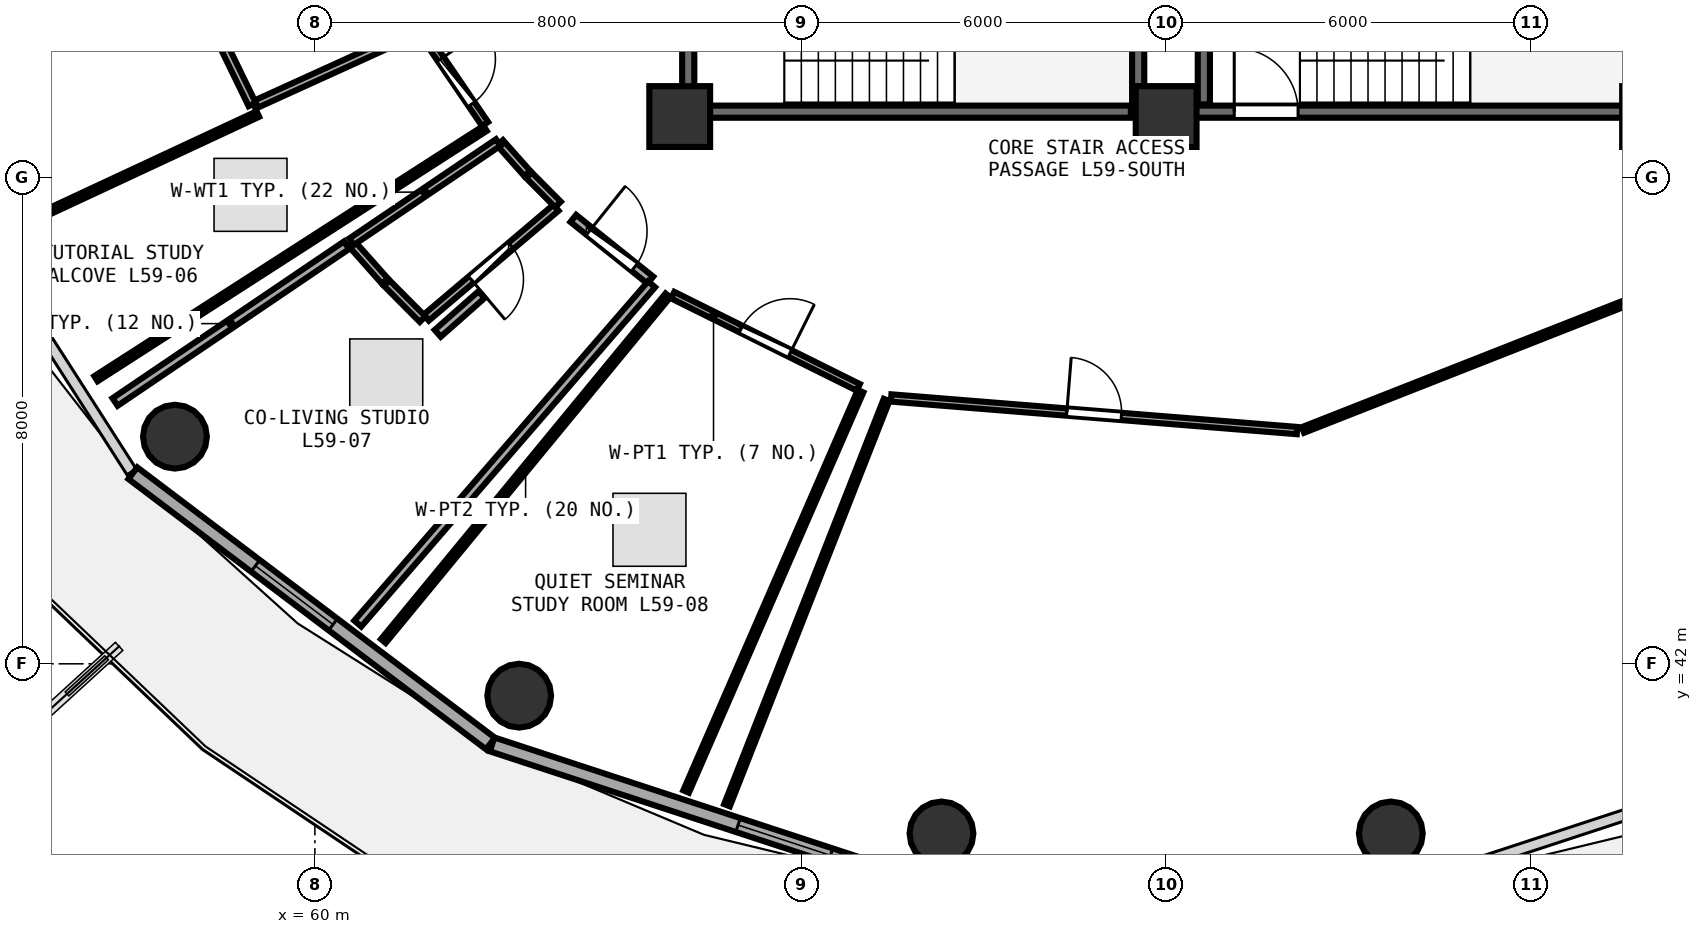
"""IFC4 building model, lengths in metres.
Left out: names, types, materials, properties, quantities, classifications, styles, units other than length and angle.
Written with IfcOpenShell. Run it as: python <this file> out.ifc"""

import sys

from ifc_helpers import new_model, si_unit, direction, frame, frame_2d, origin, origin_2d, place, context, subcontext, project, spatial, rectangle, circle, extrude, element, fill, save


model = new_model("IFC4")
c1 = context("Model", 3, precision=1e-05, world=origin(), true_north=direction((0.0, 1.0)))
c2 = subcontext(c1, "Body", "Model", "MODEL_VIEW")
j1 = project(units=[si_unit("LENGTHUNIT", "METRE"), si_unit("PLANEANGLEUNIT", "RADIAN")], contexts=[c1])
p1 = place(None, origin())
s1 = spatial("IfcSite", under=j1, at=p1, CompositionType="ELEMENT")
p2 = place(p1, origin())
s2 = spatial("IfcBuilding", under=s1, at=p2, CompositionType="ELEMENT")
p3 = place(p2, frame((0.0, 0.0, 230.7)))
s3 = spatial("IfcBuildingStorey", under=s2, at=p3, CompositionType="ELEMENT", Elevation=230.7)
for number, where, z_axis, x_axis in (
    (1, (66.0, 51.0, 0.0), (0.0, 0.0, 1.0), (1.0, 0.0, 0.0)),
    (2, (74.0, 51.0, 0.0), (0.0, 0.0, 1.0), (1.0, 0.0, 0.0)),
):
    element("IfcColumn", number, at=place(p3, frame(where, z_axis=z_axis, x_axis=x_axis)), inside=s3, PredefinedType="PILASTER", context=c2, shape_type="SweptSolid", body=[
        extrude(rectangle(XDim=1.0, YDim=1.0, at=origin_2d()), origin(), (0.0, 0.0, 1.0), 3.75),
    ])
for number, where, z_axis, x_axis in (
    (3, (57.698, 45.736, 0.0), (0.0, 0.0, 1.0), (1.0, 0.0, 0.0)),
    (4, (63.36, 41.476, 0.0), (0.0, 0.0, 1.0), (1.0, 0.0, 0.0)),
    (5, (70.305, 39.21, 0.0), (0.0, 0.0, 1.0), (1.0, 0.0, 0.0)),
    (6, (77.695, 39.21, 0.0), (0.0, 0.0, 1.0), (1.0, 0.0, 0.0)),
):
    element("IfcColumn", number, at=place(p3, frame(where, z_axis=z_axis, x_axis=x_axis)), inside=s3, PredefinedType="COLUMN", context=c2, shape_type="SweptSolid", body=[
        extrude(circle(Radius=0.525, at=origin_2d()), origin(), (0.0, 0.0, 1.0), 3.75),
    ])
p4 = place(p3, frame((57.006, 45.135, 0.0), z_axis=(0.0, 0.0, 1.0), x_axis=(0.797701674595, -0.603052268338, 0.0)))
e7 = element("IfcWall", 7, at=p4, inside=s3, PredefinedType="SOLIDWALL", context=c2, shape_type="SweptSolid", body=[
    extrude(rectangle(XDim=7.374, YDim=0.24, at=frame_2d((3.687, 0.0))), origin(), (0.0, 0.0, 1.0), 3.475),
])
p5 = place(p4, frame((2.527, 0.0, 0.85)))
e8 = element("IfcOpeningElement", 8, at=p5, cuts=e7, PredefinedType="OPENING", context=c2, shape_type="SweptSolid", body=[
    extrude(rectangle(XDim=1.6, YDim=1.45, at=frame_2d((0.8, 0.725))), frame((0.0, 0.13, 0.0), z_axis=(0.0, -1.0, 0.0), x_axis=(1.0, 0.0, 0.0)), (0.0, 0.0, 1.0), 0.26),
])
p6 = place(p3, frame((62.914, 40.675, 0.0), z_axis=(0.0, 0.0, 1.0), x_axis=(0.95022142767, -0.31157541366, 0.0)))
e9 = element("IfcWall", 9, at=p6, inside=s3, PredefinedType="SOLIDWALL", context=c2, shape_type="SweptSolid", body=[
    extrude(rectangle(XDim=7.594, YDim=0.24, at=frame_2d((3.797, 0.0))), origin(), (0.0, 0.0, 1.0), 3.475),
])
p7 = place(p6, frame((4.257, 0.0, 0.85)))
e10 = element("IfcOpeningElement", 10, at=p7, cuts=e9, PredefinedType="OPENING", context=c2, shape_type="SweptSolid", body=[
    extrude(rectangle(XDim=1.6, YDim=1.45, at=frame_2d((0.8, 0.725))), frame((0.0, 0.13, 0.0), z_axis=(0.0, -1.0, 0.0), x_axis=(1.0, 0.0, 0.0)), (0.0, 0.0, 1.0), 0.26),
])
p8 = place(p3, frame((74.0, 51.08, 0.0), z_axis=(0.0, 0.0, 1.0), x_axis=(1.0, 0.0, 0.0)))
e11 = element("IfcWall", 11, at=p8, inside=s3, PredefinedType="SHEAR", context=c2, shape_type="SweptSolid", body=[
    extrude(rectangle(XDim=7.9, YDim=0.2, at=frame_2d((3.95, 0.0))), origin(), (0.0, 0.0, 1.0), 3.49),
])
p9 = place(p8, frame((1.12, 0.0, 0.0)))
e12 = element("IfcOpeningElement", 12, at=p9, cuts=e11, PredefinedType="OPENING", context=c2, shape_type="SweptSolid", body=[
    extrude(rectangle(XDim=1.05, YDim=2.1, at=frame_2d((0.525, 1.05))), frame((0.0, 0.11, 0.0), z_axis=(0.0, -1.0, 0.0), x_axis=(1.0, 0.0, 0.0)), (0.0, 0.0, 1.0), 0.22),
])
p10 = place(p3, frame((74.62, 54.27, 0.0), z_axis=(0.0, 0.0, 1.0), x_axis=(0.0, -1.0, 0.0)))
e13 = element("IfcWall", 13, at=p10, inside=s3, PredefinedType="SHEAR", context=c2, shape_type="SweptSolid", body=[
    extrude(rectangle(XDim=3.07, YDim=0.2, at=frame_2d((1.535, 0.0))), origin(), (0.0, 0.0, 1.0), 3.49),
])
p11 = place(p3, frame((66.26, 51.08, 0.0), z_axis=(0.0, 0.0, 1.0), x_axis=(1.0, 0.0, 0.0)))
e14 = element("IfcWall", 14, at=p11, inside=s3, PredefinedType="SHEAR", context=c2, shape_type="SweptSolid", body=[
    extrude(rectangle(XDim=7.16, YDim=0.2, at=frame_2d((3.58, 0.0))), origin(), (0.0, 0.0, 1.0), 3.49),
])
p12 = place(p3, frame((73.54, 51.2, 0.0), z_axis=(0.0, 0.0, 1.0), x_axis=(0.0, 1.0, 0.0)))
e15 = element("IfcWall", 15, at=p12, inside=s3, PredefinedType="SHEAR", context=c2, shape_type="SweptSolid", body=[
    extrude(rectangle(XDim=3.07, YDim=0.2, at=frame_2d((1.535, 0.0))), origin(), (0.0, 0.0, 1.0), 3.49),
])
p13 = place(p3, frame((66.14, 54.27, 0.0), z_axis=(0.0, 0.0, 1.0), x_axis=(0.0, -1.0, 0.0)))
e16 = element("IfcWall", 16, at=p13, inside=s3, PredefinedType="SHEAR", context=c2, shape_type="SweptSolid", body=[
    extrude(rectangle(XDim=3.07, YDim=0.2, at=frame_2d((1.535, 0.0))), origin(), (0.0, 0.0, 1.0), 3.49),
])
p14 = place(p13, frame((1.01, 0.0, 0.0)))
e17 = element("IfcOpeningElement", 17, at=p14, cuts=e16, PredefinedType="OPENING", context=c2, shape_type="SweptSolid", body=[
    extrude(rectangle(XDim=1.05, YDim=2.1, at=frame_2d((0.525, 1.05))), frame((0.0, 0.11, 0.0), z_axis=(0.0, -1.0, 0.0), x_axis=(1.0, 0.0, 0.0)), (0.0, 0.0, 1.0), 0.22),
])
p15 = place(p3, frame((69.477, 46.372, 0.0), z_axis=(0.0, 0.0, 1.0), x_axis=(0.996785539967, -0.080116086476, 0.0)))
e18 = element("IfcWall", 18, at=p15, inside=s3, PredefinedType="PARTITIONING", context=c2, shape_type="SweptSolid", body=[
    extrude(rectangle(XDim=6.698, YDim=0.12, at=frame_2d((3.349, 0.0))), origin(), (0.0, 0.0, 1.0), 3.025),
])
p16 = place(p15, frame((2.899, 0.0, 0.0)))
e19 = element("IfcOpeningElement", 19, at=p16, cuts=e18, PredefinedType="OPENING", context=c2, shape_type="SweptSolid", body=[
    extrude(rectangle(XDim=0.9, YDim=2.08, at=frame_2d((0.45, 1.04))), frame((0.0, 0.07, 0.0), z_axis=(0.0, -1.0, 0.0), x_axis=(1.0, 0.0, 0.0)), (0.0, 0.0, 1.0), 0.14),
])
p17 = place(p3, frame((61.846, 52.273, 0.0), z_axis=(0.0, 0.0, 1.0), x_axis=(0.563860796601, -0.825869845712, 0.0)))
e20 = element("IfcWall", 20, at=p17, inside=s3, PredefinedType="PARTITIONING", context=c2, shape_type="SweptSolid", body=[
    extrude(rectangle(XDim=1.691, YDim=0.12, at=frame_2d((0.846, 0.0))), origin(), (0.0, 0.0, 1.0), 3.025),
])
p18 = place(p17, frame((0.396, 0.0, 0.0)))
e21 = element("IfcOpeningElement", 21, at=p18, cuts=e20, PredefinedType="OPENING", context=c2, shape_type="SweptSolid", body=[
    extrude(rectangle(XDim=0.9, YDim=2.08, at=frame_2d((0.45, 1.04))), frame((0.0, 0.07, 0.0), z_axis=(0.0, -1.0, 0.0), x_axis=(1.0, 0.0, 0.0)), (0.0, 0.0, 1.0), 0.14),
])
p19 = place(p3, frame((63.966, 49.501, 0.0), z_axis=(0.0, 0.0, 1.0), x_axis=(-0.763141339825, -0.646231611305, 0.0)))
e22 = element("IfcWall", 22, at=p19, inside=s3, PredefinedType="PLUMBINGWALL", context=c2, shape_type="SweptSolid", body=[
    extrude(rectangle(XDim=2.798, YDim=0.13, at=frame_2d((1.399, 0.0))), origin(), (0.0, 0.0, 1.0), 3.025),
])
p20 = place(p19, frame((0.969, 0.0, 0.0)))
e23 = element("IfcOpeningElement", 23, at=p20, cuts=e22, PredefinedType="OPENING", context=c2, shape_type="SweptSolid", body=[
    extrude(rectangle(XDim=0.86, YDim=2.05, at=frame_2d((0.43, 1.025))), frame((0.0, 0.075, 0.0), z_axis=(0.0, -1.0, 0.0), x_axis=(1.0, 0.0, 0.0)), (0.0, 0.0, 1.0), 0.15),
])
p21 = place(p3, frame((64.25, 49.324, 0.0), z_axis=(0.0, 0.0, 1.0), x_axis=(0.780560643324, -0.625080060547, 0.0)))
e24 = element("IfcWall", 24, at=p21, inside=s3, PredefinedType="PARTITIONING", context=c2, shape_type="SweptSolid", body=[
    extrude(rectangle(XDim=1.624, YDim=0.15, at=frame_2d((0.812, 0.0))), origin(), (0.0, 0.0, 1.0), 3.025),
])
p22 = place(p21, frame((0.337, 0.0, 0.0)))
e25 = element("IfcOpeningElement", 25, at=p22, cuts=e24, PredefinedType="OPENING", context=c2, shape_type="SweptSolid", body=[
    extrude(rectangle(XDim=0.95, YDim=2.08, at=frame_2d((0.475, 1.04))), frame((0.0, 0.085, 0.0), z_axis=(0.0, -1.0, 0.0), x_axis=(1.0, 0.0, 0.0)), (0.0, 0.0, 1.0), 0.17),
])
p23 = place(p3, frame((65.885, 48.063, 0.0), z_axis=(0.0, 0.0, 1.0), x_axis=(0.895499293581, -0.445062933973, 0.0)))
e26 = element("IfcWall", 26, at=p23, inside=s3, PredefinedType="PARTITIONING", context=c2, shape_type="SweptSolid", body=[
    extrude(rectangle(XDim=3.408, YDim=0.12, at=frame_2d((1.704, 0.0))), origin(), (0.0, 0.0, 1.0), 3.235),
])
p24 = place(p23, frame((1.254, 0.0, 0.0)))
e27 = element("IfcOpeningElement", 27, at=p24, cuts=e26, PredefinedType="OPENING", context=c2, shape_type="SweptSolid", body=[
    extrude(rectangle(XDim=0.9, YDim=2.08, at=frame_2d((0.45, 1.04))), frame((0.0, 0.07, 0.0), z_axis=(0.0, -1.0, 0.0), x_axis=(1.0, 0.0, 0.0)), (0.0, 0.0, 1.0), 0.14),
])
p25 = place(p3, frame((76.25, 45.846, 0.0), z_axis=(0.0, 0.0, 1.0), x_axis=(0.93054786628, 0.366170272635, 0.0)))
e28 = element("IfcWall", 28, at=p25, inside=s3, PredefinedType="PARTITIONING", context=c2, shape_type="SweptSolid", body=[
    extrude(rectangle(XDim=6.635, YDim=0.1, at=frame_2d((3.318, 0.0))), origin(), (0.0, 0.0, 1.0), 3.235),
])
p26 = place(p3, frame((66.778, 39.674, 0.0), z_axis=(0.0, 0.0, 1.0), x_axis=(0.366396673382, 0.930458745853, 0.0)))
e29 = element("IfcWall", 29, at=p26, inside=s3, PredefinedType="PARTITIONING", context=c2, shape_type="SweptSolid", body=[
    extrude(rectangle(XDim=7.164, YDim=0.1, at=frame_2d((3.582, 0.0))), origin(), (0.0, 0.0, 1.0), 3.075),
])
p27 = place(p3, frame((60.985, 53.961, 0.0), z_axis=(0.0, 0.0, 1.0), x_axis=(-0.954952218503, -0.29675960031, 0.0)))
e30 = element("IfcWall", 30, at=p27, inside=s3, PredefinedType="PARTITIONING", context=c2, shape_type="SweptSolid", body=[
    extrude(rectangle(XDim=6.946, YDim=0.1, at=frame_2d((3.473, 0.0))), origin(), (0.0, 0.0, 1.0), 3.175),
])
p28 = place(p3, frame((61.728, 52.43, 0.0), z_axis=(0.0, 0.0, 1.0), x_axis=(-0.910394340166, -0.413741640874, 0.0)))
e31 = element("IfcWall", 31, at=p28, inside=s3, PredefinedType="PLUMBINGWALL", context=c2, shape_type="SweptSolid", body=[
    extrude(rectangle(XDim=3.0, YDim=0.13, at=frame_2d((1.5, 0.0))), origin(), (0.0, 0.0, 1.0), 3.025),
])
p29 = place(p3, frame((58.969, 51.198, 0.0), z_axis=(0.0, 0.0, 1.0), x_axis=(-0.437811526414, 0.899066775795, 0.0)))
e32 = element("IfcWall", 32, at=p29, inside=s3, PredefinedType="PLUMBINGWALL", context=c2, shape_type="SweptSolid", body=[
    extrude(rectangle(XDim=1.666, YDim=0.13, at=frame_2d((0.833, 0.0))), origin(), (0.0, 0.0, 1.0), 3.025),
])
p30 = place(p3, frame((62.799, 50.805, 0.0), z_axis=(0.0, 0.0, 1.0), x_axis=(-0.841021030646, -0.541002426992, 0.0)))
e33 = element("IfcWall", 33, at=p30, inside=s3, PredefinedType="PARTITIONING", context=c2, shape_type="SweptSolid", body=[
    extrude(rectangle(XDim=7.609, YDim=0.1, at=frame_2d((3.805, 0.0))), origin(), (0.0, 0.0, 1.0), 3.075),
])
p31 = place(p3, frame((54.79, 49.049, 0.0), z_axis=(0.0, 0.0, 1.0), x_axis=(0.906304818196, 0.422624628381, 0.0)))
e34 = element("IfcWall", 34, at=p31, inside=s3, PredefinedType="PARTITIONING", context=c2, shape_type="SweptSolid", body=[
    extrude(rectangle(XDim=4.714, YDim=0.1, at=frame_2d((2.357, 0.0))), origin(), (0.0, 0.0, 1.0), 3.075),
])
p32 = place(p3, frame((63.044, 50.569, 0.0), z_axis=(0.0, 0.0, 1.0), x_axis=(0.663846659507, -0.74786871352, 0.0)))
e35 = element("IfcWall", 35, at=p32, inside=s3, PredefinedType="PLUMBINGWALL", context=c2, shape_type="SweptSolid", body=[
    extrude(rectangle(XDim=0.674, YDim=0.13, at=frame_2d((0.337, 0.0))), origin(), (0.0, 0.0, 1.0), 3.48),
])
p33 = place(p3, frame((63.519, 50.036, 0.0), z_axis=(0.0, 0.0, 1.0), x_axis=(0.704946592253, -0.70926039088, 0.0)))
e36 = element("IfcWall", 36, at=p33, inside=s3, PredefinedType="PLUMBINGWALL", context=c2, shape_type="SweptSolid", body=[
    extrude(rectangle(XDim=0.679, YDim=0.13, at=frame_2d((0.34, 0.0))), origin(), (0.0, 0.0, 1.0), 3.025),
])
p34 = place(p3, frame((61.771, 47.668, 0.0), z_axis=(0.0, 0.0, 1.0), x_axis=(-0.704918740806, 0.709288071844, 0.0)))
e37 = element("IfcWall", 37, at=p34, inside=s3, PredefinedType="PLUMBINGWALL", context=c2, shape_type="SweptSolid", body=[
    extrude(rectangle(XDim=0.838, YDim=0.13, at=frame_2d((0.419, 0.0))), origin(), (0.0, 0.0, 1.0), 3.025),
])
p35 = place(p3, frame((61.153, 48.292, 0.0), z_axis=(0.0, 0.0, 1.0), x_axis=(-0.663963631636, 0.747764866696, 0.0)))
e38 = element("IfcWall", 38, at=p35, inside=s3, PredefinedType="PLUMBINGWALL", context=c2, shape_type="SweptSolid", body=[
    extrude(rectangle(XDim=0.833, YDim=0.13, at=frame_2d((0.417, 0.0))), origin(), (0.0, 0.0, 1.0), 3.48),
])
p36 = place(p3, frame((60.603, 48.941, 0.0), z_axis=(0.0, 0.0, 1.0), x_axis=(0.828277690913, 0.560317826538, 0.0)))
e39 = element("IfcWall", 39, at=p36, inside=s3, PredefinedType="PLUMBINGWALL", context=c2, shape_type="SweptSolid", body=[
    extrude(rectangle(XDim=2.912, YDim=0.13, at=frame_2d((1.456, 0.0))), origin(), (0.0, 0.0, 1.0), 3.235),
])
p37 = place(p3, frame((65.538, 48.242, 0.0), z_axis=(0.0, 0.0, 1.0), x_axis=(-0.654642167947, -0.755938907549, 0.0)))
e40 = element("IfcWall", 40, at=p37, inside=s3, PredefinedType="PARTITIONING", context=c2, shape_type="SweptSolid", body=[
    extrude(rectangle(XDim=7.382, YDim=0.15, at=frame_2d((3.691, 0.0))), origin(), (0.0, 0.0, 1.0), 3.025),
])
p38 = place(p3, frame((56.713, 46.305, 0.0), z_axis=(0.0, 0.0, 1.0), x_axis=(0.828059419786, 0.560640345768, 0.0)))
e41 = element("IfcWall", 41, at=p38, inside=s3, PredefinedType="PARTITIONING", context=c2, shape_type="SweptSolid", body=[
    extrude(rectangle(XDim=4.599, YDim=0.15, at=frame_2d((2.299, 0.0))), origin(), (0.0, 0.0, 1.0), 3.075),
])
p39 = place(p3, frame((62.02, 47.435, 0.0), z_axis=(0.0, 0.0, 1.0), x_axis=(0.749645272156, 0.661839834049, 0.0)))
e42 = element("IfcWall", 42, at=p39, inside=s3, PredefinedType="PARTITIONING", context=c2, shape_type="SweptSolid", body=[
    extrude(rectangle(XDim=0.962, YDim=0.15, at=frame_2d((0.481, 0.0))), origin(), (0.0, 0.0, 1.0), 3.48),
])
p40 = place(p3, frame((68.974, 46.483, 0.0), z_axis=(0.0, 0.0, 1.0), x_axis=(-0.399504113712, -0.916731401844, 0.0)))
e43 = element("IfcWall", 43, at=p40, inside=s3, PredefinedType="PARTITIONING", context=c2, shape_type="SweptSolid", body=[
    extrude(rectangle(XDim=7.182, YDim=0.1, at=frame_2d((3.591, 0.0))), origin(), (0.0, 0.0, 1.0), 3.075),
])
p41 = place(p3, frame((61.125, 42.374, 0.0), z_axis=(0.0, 0.0, 1.0), x_axis=(0.635558493253, 0.772052719478, 0.0)))
e44 = element("IfcWall", 44, at=p41, inside=s3, PredefinedType="PARTITIONING", context=c2, shape_type="SweptSolid", body=[
    extrude(rectangle(XDim=7.364, YDim=0.1, at=frame_2d((3.682, 0.0))), origin(), (0.0, 0.0, 1.0), 3.025),
])
p42 = place(p5, origin())
e45 = element("IfcWindow", 45, at=p42, inside=s3, PartitioningType="SINGLE_PANEL", PredefinedType="WINDOW", context=c2, shape_type="SweptSolid", body=[
    extrude(rectangle(XDim=1.6, YDim=1.45, at=frame_2d((0.8, 0.725))), frame((0.0, 0.03, 0.0), z_axis=(0.0, -1.0, 0.0), x_axis=(1.0, 0.0, 0.0)), (0.0, 0.0, 1.0), 0.06),
])
fill(e8, e45)
p43 = place(p7, origin())
e46 = element("IfcWindow", 46, at=p43, inside=s3, PartitioningType="SINGLE_PANEL", PredefinedType="WINDOW", context=c2, shape_type="SweptSolid", body=[
    extrude(rectangle(XDim=1.6, YDim=1.45, at=frame_2d((0.8, 0.725))), frame((0.0, 0.03, 0.0), z_axis=(0.0, -1.0, 0.0), x_axis=(1.0, 0.0, 0.0)), (0.0, 0.0, 1.0), 0.06),
])
fill(e10, e46)
p44 = place(p9, origin())
e47 = element("IfcDoor", 47, at=p44, inside=s3, OperationType="SINGLE_SWING_LEFT", PredefinedType="DOOR", context=c2, shape_type="SweptSolid", body=[
    extrude(rectangle(XDim=1.05, YDim=2.1, at=frame_2d((0.525, 1.05))), frame((0.0, 0.025, 0.0), z_axis=(0.0, -1.0, 0.0), x_axis=(1.0, 0.0, 0.0)), (0.0, 0.0, 1.0), 0.05),
])
fill(e12, e47)
p45 = place(p16, origin())
e48 = element("IfcDoor", 48, at=p45, inside=s3, OperationType="SINGLE_SWING_LEFT", PredefinedType="DOOR", context=c2, shape_type="SweptSolid", body=[
    extrude(rectangle(XDim=0.9, YDim=2.08, at=frame_2d((0.45, 1.04))), frame((0.0, 0.025, 0.0), z_axis=(0.0, -1.0, 0.0), x_axis=(1.0, 0.0, 0.0)), (0.0, 0.0, 1.0), 0.05),
])
fill(e19, e48)
p46 = place(p18, origin())
e49 = element("IfcDoor", 49, at=p46, inside=s3, OperationType="SINGLE_SWING_LEFT", PredefinedType="DOOR", context=c2, shape_type="SweptSolid", body=[
    extrude(rectangle(XDim=0.9, YDim=2.08, at=frame_2d((0.45, 1.04))), frame((0.0, 0.025, 0.0), z_axis=(0.0, -1.0, 0.0), x_axis=(1.0, 0.0, 0.0)), (0.0, 0.0, 1.0), 0.05),
])
fill(e21, e49)
p47 = place(p20, origin())
e50 = element("IfcDoor", 50, at=p47, inside=s3, OperationType="SINGLE_SWING_RIGHT", PredefinedType="DOOR", context=c2, shape_type="SweptSolid", body=[
    extrude(rectangle(XDim=0.86, YDim=2.05, at=frame_2d((0.43, 1.025))), frame((0.0, 0.025, 0.0), z_axis=(0.0, -1.0, 0.0), x_axis=(1.0, 0.0, 0.0)), (0.0, 0.0, 1.0), 0.05),
])
fill(e23, e50)
p48 = place(p22, origin())
e51 = element("IfcDoor", 51, at=p48, inside=s3, OperationType="SINGLE_SWING_LEFT", PredefinedType="DOOR", context=c2, shape_type="SweptSolid", body=[
    extrude(rectangle(XDim=0.95, YDim=2.08, at=frame_2d((0.475, 1.04))), frame((0.0, 0.025, 0.0), z_axis=(0.0, -1.0, 0.0), x_axis=(1.0, 0.0, 0.0)), (0.0, 0.0, 1.0), 0.05),
])
fill(e25, e51)
p49 = place(p24, origin())
e52 = element("IfcDoor", 52, at=p49, inside=s3, OperationType="SINGLE_SWING_RIGHT", PredefinedType="DOOR", context=c2, shape_type="SweptSolid", body=[
    extrude(rectangle(XDim=0.9, YDim=2.08, at=frame_2d((0.45, 1.04))), frame((0.0, 0.025, 0.0), z_axis=(0.0, -1.0, 0.0), x_axis=(1.0, 0.0, 0.0)), (0.0, 0.0, 1.0), 0.05),
])
fill(e27, e52)
save(model, sys.argv[1])
